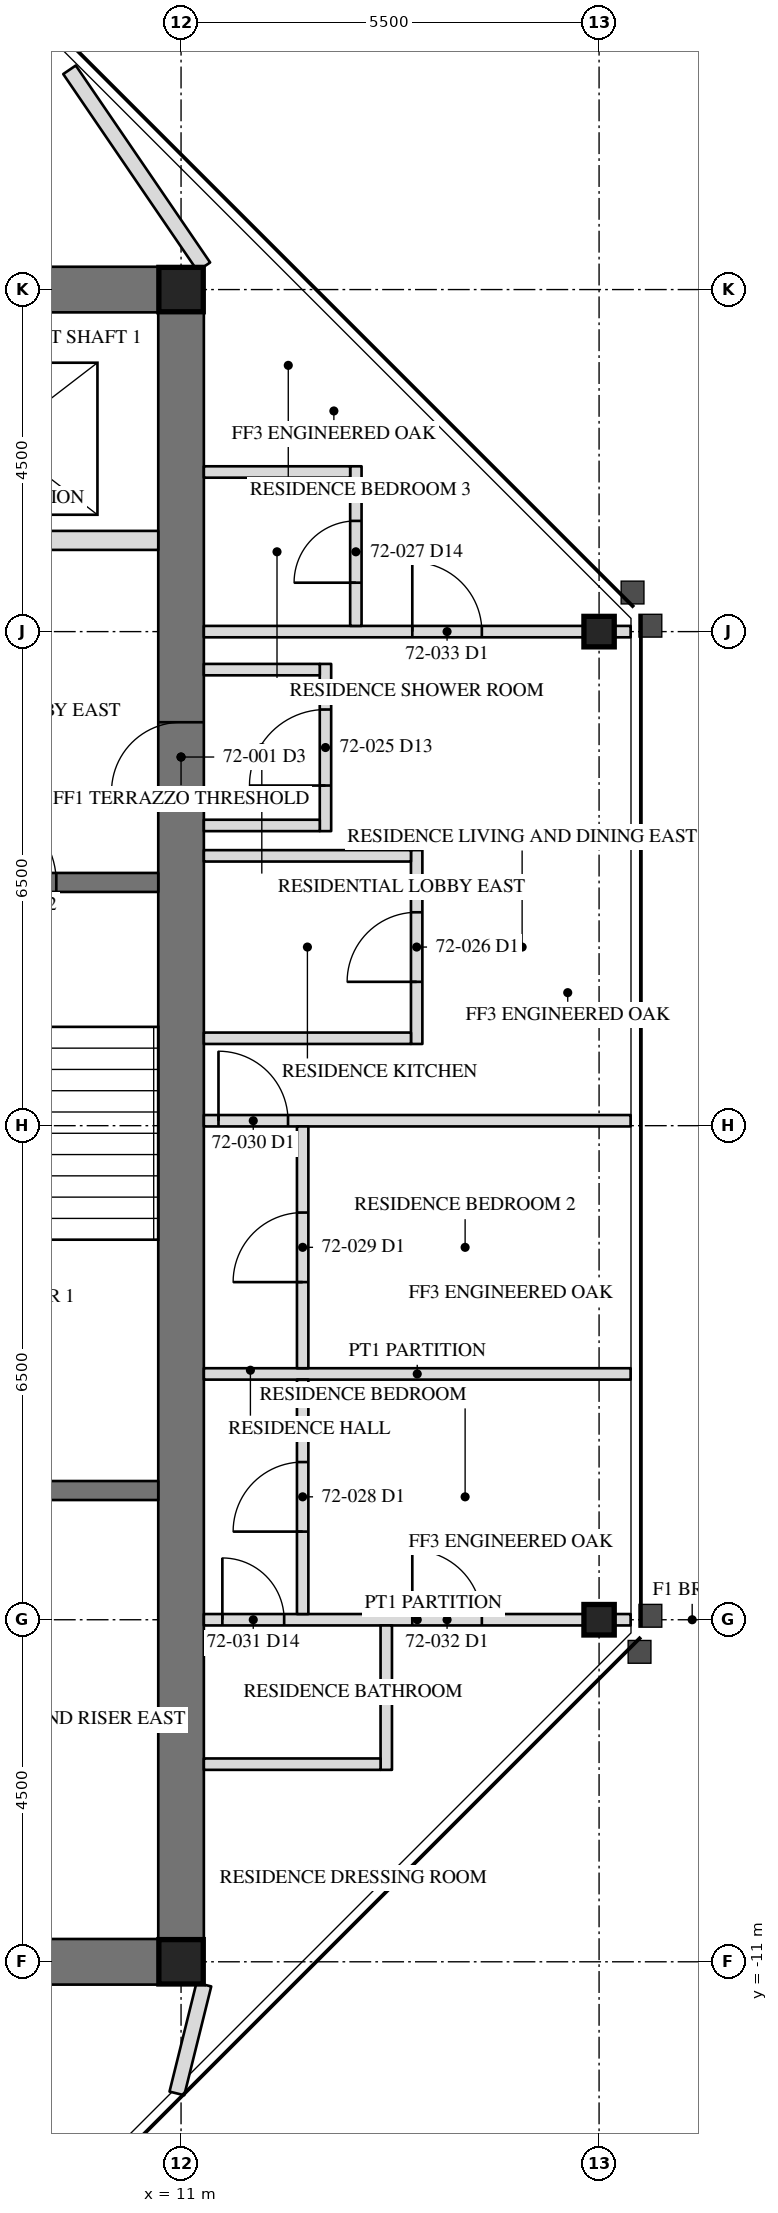
"""IFC4 building model, lengths in metres.
Left out: names, types, materials, properties, quantities, classifications, styles, units other than length and angle.
Written with IfcOpenShell. Run it as: python <this file> out.ifc"""

import sys

from ifc_helpers import new_model, si_unit, direction, frame, frame_2d, origin, origin_2d, place, context, subcontext, project, spatial, rectangle, hollow_rectangle, i_section, extrude, element, fill, save


model = new_model("IFC4")
c1 = context("Model", 3, precision=1e-05, world=origin(), true_north=direction((0.0, 1.0)))
c2 = subcontext(c1, "Body", "Model", "MODEL_VIEW")
j1 = project(units=[si_unit("LENGTHUNIT", "METRE"), si_unit("PLANEANGLEUNIT", "RADIAN")], contexts=[c1])
p1 = place(None, origin())
s1 = spatial("IfcSite", under=j1, at=p1, CompositionType="ELEMENT")
p2 = place(p1, origin())
s2 = spatial("IfcBuilding", under=s1, at=p2, CompositionType="ELEMENT")
p3 = place(p2, frame((0.0, 0.0, 292.0)))
s3 = spatial("IfcBuildingStorey", under=s2, at=p3, CompositionType="ELEMENT", Elevation=292.0)
for number, where, z_axis, x_axis in (
    (1, (16.5, -6.5, 0.0), (0.0, 0.0, 1.0), (0.0, 1.0, 0.0)),
    (2, (16.5, 6.5, 0.0), (0.0, 0.0, 1.0), (0.0, 1.0, 0.0)),
):
    element("IfcColumn", number, at=place(p3, frame(where, z_axis=z_axis, x_axis=x_axis)), inside=s3, PredefinedType="COLUMN", context=c2, shape_type="SweptSolid", body=[
        extrude(i_section(OverallWidth=0.401, OverallDepth=0.399, WebThickness=0.025, FlangeThickness=0.04, at=origin_2d()), origin(), (0.0, 0.0, 1.0), 3.6),
    ])
p4 = place(p3, frame((11.0, -11.0, 0.0), z_axis=(0.0, 0.0, 1.0), x_axis=(0.0, 1.0, 0.0)))
e3 = element("IfcWall", 3, at=p4, inside=s3, PredefinedType="SHEAR", context=c2, shape_type="SweptSolid", body=[
    extrude(rectangle(XDim=22.0, YDim=0.6, at=frame_2d((11.0, 0.0))), origin(), (0.0, 0.0, 1.0), 3.6),
])
p5 = place(p4, frame((15.393, 0.0, 0.0)))
e4 = element("IfcOpeningElement", 4, at=p5, cuts=e3, PredefinedType="OPENING", context=c2, shape_type="SweptSolid", body=[
    extrude(rectangle(XDim=0.915, YDim=2.134, at=frame_2d((0.458, 1.067))), frame((0.0, 0.31, 0.0), z_axis=(0.0, -1.0, 0.0), x_axis=(1.0, 0.0, 0.0)), (0.0, 0.0, 1.0), 0.62),
])
for number, where, z_axis, x_axis in (
    (5, (11.0, 11.0, 0.0), (0.0, 0.0, 1.0), (-1.0, 0.0, 0.0)),
    (6, (6.5, -11.0, 0.0), (0.0, 0.0, 1.0), (1.0, 0.0, 0.0)),
):
    element("IfcWall", number, at=place(p3, frame(where, z_axis=z_axis, x_axis=x_axis)), inside=s3, PredefinedType="SHEAR", context=c2, shape_type="SweptSolid", body=[
        extrude(rectangle(XDim=4.5, YDim=0.6, at=frame_2d((2.25, 0.0))), origin(), (0.0, 0.0, 1.0), 3.6),
    ])
for number, where, z_axis, x_axis in (
    (7, (11.0, 11.0, 0.0), (0.0, 0.0, 1.0), (1.0, 0.0, 0.0)),
    (8, (11.0, -11.0, 0.0), (0.0, 0.0, 1.0), (1.0, 0.0, 0.0)),
):
    element("IfcColumn", number, at=place(p3, frame(where, z_axis=z_axis, x_axis=x_axis)), inside=s3, PredefinedType="COLUMN", context=c2, shape_type="SweptSolid", body=[
        extrude(hollow_rectangle(XDim=0.584, YDim=0.584, WallThickness=0.051, at=origin_2d()), origin(), (0.0, 0.0, 1.0), 3.6),
    ])
p6 = place(p3, frame((6.95, -4.8, 0.0), z_axis=(0.0, 0.0, 1.0), x_axis=(1.0, 0.0, 0.0)))
e9 = element("IfcWall", 9, at=p6, inside=s3, PredefinedType="SOLIDWALL", context=c2, shape_type="SweptSolid", body=[
    extrude(rectangle(XDim=3.75, YDim=0.25, at=frame_2d((1.875, 0.0))), origin(), (0.0, 0.0, 1.0), 3.41),
])
p7 = place(p3, frame((6.95, 3.2, 0.0), z_axis=(0.0, 0.0, 1.0), x_axis=(1.0, 0.0, 0.0)))
e10 = element("IfcWall", 10, at=p7, inside=s3, PredefinedType="SOLIDWALL", context=c2, shape_type="SweptSolid", body=[
    extrude(rectangle(XDim=3.75, YDim=0.25, at=frame_2d((1.875, 0.0))), origin(), (0.0, 0.0, 1.0), 3.41),
])
p8 = place(p7, frame((1.342, 0.0, 0.0)))
e11 = element("IfcOpeningElement", 11, at=p8, cuts=e10, PredefinedType="OPENING", context=c2, shape_type="SweptSolid", body=[
    extrude(rectangle(XDim=1.067, YDim=2.134, at=frame_2d((0.533, 1.067))), frame((0.0, 0.135, 0.0), z_axis=(0.0, -1.0, 0.0), x_axis=(1.0, 0.0, 0.0)), (0.0, 0.0, 1.0), 0.27),
])
p9 = place(p3, frame((6.95, 7.7, 0.0), z_axis=(0.0, 0.0, 1.0), x_axis=(1.0, 0.0, 0.0)))
e12 = element("IfcWall", 12, at=p9, inside=s3, PredefinedType="PARTITIONING", context=c2, shape_type="SweptSolid", body=[
    extrude(rectangle(XDim=3.75, YDim=0.25, at=frame_2d((1.875, 0.0))), origin(), (0.0, 0.0, 1.0), 3.41),
])
p10 = place(p9, frame((0.45, 0.0, 0.0)))
e13 = element("IfcOpeningElement", 13, at=p10, cuts=e12, PredefinedType="OPENING", context=c2, shape_type="SweptSolid", body=[
    extrude(rectangle(XDim=1.219, YDim=2.134, at=frame_2d((0.609, 1.067))), frame((0.0, 0.135, 0.0), z_axis=(0.0, -1.0, 0.0), x_axis=(1.0, 0.0, 0.0)), (0.0, 0.0, 1.0), 0.27),
])
p11 = place(p3, frame((11.3, 11.3, 0.0), z_axis=(0.0, 0.0, 1.0), x_axis=(-0.563469639691, 0.826136771453, 0.0)))
e14 = element("IfcWall", 14, at=p11, inside=s3, PredefinedType="PARTITIONING", context=c2, shape_type="SweptSolid", body=[
    extrude(rectangle(XDim=3.137, YDim=0.2, at=frame_2d((1.568, 0.0))), origin(), (0.0, 0.0, 1.0), 2.704),
])
p12 = place(p3, frame((11.3, -11.3, 0.0), z_axis=(0.0, 0.0, 1.0), x_axis=(-0.24050983258, -0.970646702169, 0.0)))
e15 = element("IfcWall", 15, at=p12, inside=s3, PredefinedType="PARTITIONING", context=c2, shape_type="SweptSolid", body=[
    extrude(rectangle(XDim=1.475, YDim=0.2, at=frame_2d((0.737, 0.0))), origin(), (0.0, 0.0, 1.0), 3.41),
])
p13 = place(p3, frame((11.3, -6.5, 0.0), z_axis=(0.0, 0.0, 1.0), x_axis=(1.0, 0.0, 0.0)))
e16 = element("IfcWall", 16, at=p13, inside=s3, PredefinedType="PARTITIONING", context=c2, shape_type="SweptSolid", body=[
    extrude(rectangle(XDim=5.615, YDim=0.15, at=frame_2d((2.808, 0.0))), origin(), (0.0, 0.0, 1.0), 2.966),
])
p14 = place(p13, frame((0.243, 0.0, 0.0)))
e17 = element("IfcOpeningElement", 17, at=p14, cuts=e16, PredefinedType="OPENING", context=c2, shape_type="SweptSolid", body=[
    extrude(rectangle(XDim=0.813, YDim=2.032, at=frame_2d((0.406, 1.016))), frame((0.0, 0.085, 0.0), z_axis=(0.0, -1.0, 0.0), x_axis=(1.0, 0.0, 0.0)), (0.0, 0.0, 1.0), 0.17),
])
p15 = place(p13, frame((2.742, 0.0, 0.0)))
e18 = element("IfcOpeningElement", 18, at=p15, cuts=e16, PredefinedType="OPENING", context=c2, shape_type="SweptSolid", body=[
    extrude(rectangle(XDim=0.915, YDim=2.134, at=frame_2d((0.458, 1.067))), frame((0.0, 0.085, 0.0), z_axis=(0.0, -1.0, 0.0), x_axis=(1.0, 0.0, 0.0)), (0.0, 0.0, 1.0), 0.17),
])
p16 = place(p3, frame((11.3, -3.266, 0.0), z_axis=(0.0, 0.0, 1.0), x_axis=(1.0, 0.0, 0.0)))
e19 = element("IfcWall", 19, at=p16, inside=s3, PredefinedType="PARTITIONING", context=c2, shape_type="SweptSolid", body=[
    extrude(rectangle(XDim=5.615, YDim=0.15, at=frame_2d((2.808, 0.0))), origin(), (0.0, 0.0, 1.0), 2.709),
])
p17 = place(p3, frame((11.3, 0.065, 0.0), z_axis=(0.0, 0.0, 1.0), x_axis=(1.0, 0.0, 0.0)))
e20 = element("IfcWall", 20, at=p17, inside=s3, PredefinedType="PARTITIONING", context=c2, shape_type="SweptSolid", body=[
    extrude(rectangle(XDim=5.615, YDim=0.15, at=frame_2d((2.808, 0.0))), origin(), (0.0, 0.0, 1.0), 2.709),
])
p18 = place(p17, frame((0.192, 0.0, 0.0)))
e21 = element("IfcOpeningElement", 21, at=p18, cuts=e20, PredefinedType="OPENING", context=c2, shape_type="SweptSolid", body=[
    extrude(rectangle(XDim=0.915, YDim=2.134, at=frame_2d((0.458, 1.067))), frame((0.0, 0.085, 0.0), z_axis=(0.0, -1.0, 0.0), x_axis=(1.0, 0.0, 0.0)), (0.0, 0.0, 1.0), 0.17),
])
p19 = place(p3, frame((11.3, 6.5, 0.0), z_axis=(0.0, 0.0, 1.0), x_axis=(1.0, 0.0, 0.0)))
e22 = element("IfcWall", 22, at=p19, inside=s3, PredefinedType="PARTITIONING", context=c2, shape_type="SweptSolid", body=[
    extrude(rectangle(XDim=5.615, YDim=0.15, at=frame_2d((2.808, 0.0))), origin(), (0.0, 0.0, 1.0), 2.966),
])
p20 = place(p19, frame((2.742, 0.0, 0.0)))
e23 = element("IfcOpeningElement", 23, at=p20, cuts=e22, PredefinedType="OPENING", context=c2, shape_type="SweptSolid", body=[
    extrude(rectangle(XDim=0.915, YDim=2.134, at=frame_2d((0.458, 1.067))), frame((0.0, 0.085, 0.0), z_axis=(0.0, -1.0, 0.0), x_axis=(1.0, 0.0, 0.0)), (0.0, 0.0, 1.0), 0.17),
])
p21 = place(p3, frame((12.9, 3.875, 0.0), z_axis=(0.0, 0.0, 1.0), x_axis=(0.0, 1.0, 0.0)))
e24 = element("IfcWall", 24, at=p21, inside=s3, PredefinedType="PARTITIONING", context=c2, shape_type="SweptSolid", body=[
    extrude(rectangle(XDim=2.2, YDim=0.15, at=frame_2d((1.1, 0.0))), origin(), (0.0, 0.0, 1.0), 3.41),
])
p22 = place(p21, frame((0.6, 0.0, 0.0)))
e25 = element("IfcOpeningElement", 25, at=p22, cuts=e24, PredefinedType="OPENING", context=c2, shape_type="SweptSolid", body=[
    extrude(rectangle(XDim=1.0, YDim=2.134, at=frame_2d((0.5, 1.067))), frame((0.0, 0.085, 0.0), z_axis=(0.0, -1.0, 0.0), x_axis=(1.0, 0.0, 0.0)), (0.0, 0.0, 1.0), 0.17),
])
for number, where, z_axis, x_axis in (
    (26, (11.3, 3.95, 0.0), (0.0, 0.0, 1.0), (1.0, 0.0, 0.0)),
    (27, (11.3, 6.0, 0.0), (0.0, 0.0, 1.0), (1.0, 0.0, 0.0)),
):
    element("IfcWall", number, at=place(p3, frame(where, z_axis=z_axis, x_axis=x_axis)), inside=s3, PredefinedType="PARTITIONING", context=c2, shape_type="SweptSolid", body=[
        extrude(rectangle(XDim=1.525, YDim=0.15, at=frame_2d((0.762, 0.0))), origin(), (0.0, 0.0, 1.0), 3.41),
    ])
p23 = place(p3, frame((14.1, 1.075, 0.0), z_axis=(0.0, 0.0, 1.0), x_axis=(0.0, 1.0, 0.0)))
e28 = element("IfcWall", 28, at=p23, inside=s3, PredefinedType="PARTITIONING", context=c2, shape_type="SweptSolid", body=[
    extrude(rectangle(XDim=2.55, YDim=0.15, at=frame_2d((1.275, 0.0))), origin(), (0.0, 0.0, 1.0), 3.41),
])
p24 = place(p23, frame((0.817, 0.0, 0.0)))
e29 = element("IfcOpeningElement", 29, at=p24, cuts=e28, PredefinedType="OPENING", context=c2, shape_type="SweptSolid", body=[
    extrude(rectangle(XDim=0.915, YDim=2.134, at=frame_2d((0.458, 1.067))), frame((0.0, 0.085, 0.0), z_axis=(0.0, -1.0, 0.0), x_axis=(1.0, 0.0, 0.0)), (0.0, 0.0, 1.0), 0.17),
])
for number, where, z_axis, x_axis in (
    (30, (11.3, 1.15, 0.0), (0.0, 0.0, 1.0), (1.0, 0.0, 0.0)),
    (31, (11.3, 3.55, 0.0), (0.0, 0.0, 1.0), (1.0, 0.0, 0.0)),
):
    element("IfcWall", number, at=place(p3, frame(where, z_axis=z_axis, x_axis=x_axis)), inside=s3, PredefinedType="PARTITIONING", context=c2, shape_type="SweptSolid", body=[
        extrude(rectangle(XDim=2.725, YDim=0.15, at=frame_2d((1.362, 0.0))), origin(), (0.0, 0.0, 1.0), 3.41),
    ])
p25 = place(p3, frame((13.3, 6.575, 0.0), z_axis=(0.0, 0.0, 1.0), x_axis=(0.0, 1.0, 0.0)))
e32 = element("IfcWall", 32, at=p25, inside=s3, PredefinedType="PARTITIONING", context=c2, shape_type="SweptSolid", body=[
    extrude(rectangle(XDim=2.1, YDim=0.15, at=frame_2d((1.05, 0.0))), origin(), (0.0, 0.0, 1.0), 3.41),
])
p26 = place(p25, frame((0.569, 0.0, 0.0)))
e33 = element("IfcOpeningElement", 33, at=p26, cuts=e32, PredefinedType="OPENING", context=c2, shape_type="SweptSolid", body=[
    extrude(rectangle(XDim=0.813, YDim=2.032, at=frame_2d((0.406, 1.016))), frame((0.0, 0.085, 0.0), z_axis=(0.0, -1.0, 0.0), x_axis=(1.0, 0.0, 0.0)), (0.0, 0.0, 1.0), 0.17),
])
p27 = place(p3, frame((11.3, 8.6, 0.0), z_axis=(0.0, 0.0, 1.0), x_axis=(1.0, 0.0, 0.0)))
e34 = element("IfcWall", 34, at=p27, inside=s3, PredefinedType="PARTITIONING", context=c2, shape_type="SweptSolid", body=[
    extrude(rectangle(XDim=1.925, YDim=0.15, at=frame_2d((0.962, 0.0))), origin(), (0.0, 0.0, 1.0), 3.41),
])
p28 = place(p3, frame((12.6, -6.425, 0.0), z_axis=(0.0, 0.0, 1.0), x_axis=(0.0, 1.0, 0.0)))
e35 = element("IfcWall", 35, at=p28, inside=s3, PredefinedType="PARTITIONING", context=c2, shape_type="SweptSolid", body=[
    extrude(rectangle(XDim=3.084, YDim=0.15, at=frame_2d((1.542, 0.0))), origin(), (0.0, 0.0, 1.0), 3.41),
])
p29 = place(p28, frame((1.084, 0.0, 0.0)))
e36 = element("IfcOpeningElement", 36, at=p29, cuts=e35, PredefinedType="OPENING", context=c2, shape_type="SweptSolid", body=[
    extrude(rectangle(XDim=0.915, YDim=2.134, at=frame_2d((0.458, 1.067))), frame((0.0, 0.085, 0.0), z_axis=(0.0, -1.0, 0.0), x_axis=(1.0, 0.0, 0.0)), (0.0, 0.0, 1.0), 0.17),
])
p30 = place(p3, frame((12.6, -3.191, 0.0), z_axis=(0.0, 0.0, 1.0), x_axis=(0.0, 1.0, 0.0)))
e37 = element("IfcWall", 37, at=p30, inside=s3, PredefinedType="PARTITIONING", context=c2, shape_type="SweptSolid", body=[
    extrude(rectangle(XDim=3.181, YDim=0.15, at=frame_2d((1.59, 0.0))), origin(), (0.0, 0.0, 1.0), 3.41),
])
p31 = place(p30, frame((1.133, 0.0, 0.0)))
e38 = element("IfcOpeningElement", 38, at=p31, cuts=e37, PredefinedType="OPENING", context=c2, shape_type="SweptSolid", body=[
    extrude(rectangle(XDim=0.915, YDim=2.134, at=frame_2d((0.458, 1.067))), frame((0.0, 0.085, 0.0), z_axis=(0.0, -1.0, 0.0), x_axis=(1.0, 0.0, 0.0)), (0.0, 0.0, 1.0), 0.17),
])
p32 = place(p3, frame((13.7, -6.575, 0.0), z_axis=(0.0, 0.0, 1.0), x_axis=(0.0, -1.0, 0.0)))
e39 = element("IfcWall", 39, at=p32, inside=s3, PredefinedType="PARTITIONING", context=c2, shape_type="SweptSolid", body=[
    extrude(rectangle(XDim=1.9, YDim=0.15, at=frame_2d((0.95, 0.0))), origin(), (0.0, 0.0, 1.0), 3.41),
])
p33 = place(p3, frame((11.3, -8.4, 0.0), z_axis=(0.0, 0.0, 1.0), x_axis=(1.0, 0.0, 0.0)))
e40 = element("IfcWall", 40, at=p33, inside=s3, PredefinedType="PARTITIONING", context=c2, shape_type="SweptSolid", body=[
    extrude(rectangle(XDim=2.325, YDim=0.15, at=frame_2d((1.163, 0.0))), origin(), (0.0, 0.0, 1.0), 3.41),
])
p34 = place(p5, origin())
e41 = element("IfcDoor", 41, at=p34, inside=s3, OperationType="SINGLE_SWING_RIGHT", PredefinedType="DOOR", context=c2, shape_type="SweptSolid", body=[
    extrude(rectangle(XDim=0.915, YDim=2.134, at=frame_2d((0.458, 1.067))), frame((0.0, -0.225, 0.0), z_axis=(0.0, -1.0, 0.0), x_axis=(1.0, 0.0, 0.0)), (0.0, 0.0, 1.0), 0.05),
])
fill(e4, e41)
p35 = place(p8, origin())
e42 = element("IfcDoor", 42, at=p35, inside=s3, OperationType="SINGLE_SWING_LEFT", PredefinedType="DOOR", context=c2, shape_type="SweptSolid", body=[
    extrude(rectangle(XDim=1.067, YDim=2.134, at=frame_2d((0.533, 1.067))), frame((0.0, 0.025, 0.0), z_axis=(0.0, -1.0, 0.0), x_axis=(1.0, 0.0, 0.0)), (0.0, 0.0, 1.0), 0.05),
])
fill(e11, e42)
p36 = place(p22, origin())
e43 = element("IfcDoor", 43, at=p36, inside=s3, OperationType="SINGLE_SWING_RIGHT", PredefinedType="DOOR", context=c2, shape_type="SweptSolid", body=[
    extrude(rectangle(XDim=1.0, YDim=2.134, at=frame_2d((0.5, 1.067))), frame((0.0, 0.025, 0.0), z_axis=(0.0, -1.0, 0.0), x_axis=(1.0, 0.0, 0.0)), (0.0, 0.0, 1.0), 0.05),
])
fill(e25, e43)
p37 = place(p24, origin())
e44 = element("IfcDoor", 44, at=p37, inside=s3, OperationType="SINGLE_SWING_LEFT", PredefinedType="DOOR", context=c2, shape_type="SweptSolid", body=[
    extrude(rectangle(XDim=0.915, YDim=2.134, at=frame_2d((0.458, 1.067))), frame((0.0, 0.025, 0.0), z_axis=(0.0, -1.0, 0.0), x_axis=(1.0, 0.0, 0.0)), (0.0, 0.0, 1.0), 0.05),
])
fill(e29, e44)
p38 = place(p26, origin())
e45 = element("IfcDoor", 45, at=p38, inside=s3, OperationType="SINGLE_SWING_LEFT", PredefinedType="DOOR", context=c2, shape_type="SweptSolid", body=[
    extrude(rectangle(XDim=0.813, YDim=2.032, at=frame_2d((0.406, 1.016))), frame((0.0, 0.025, 0.0), z_axis=(0.0, -1.0, 0.0), x_axis=(1.0, 0.0, 0.0)), (0.0, 0.0, 1.0), 0.05),
])
fill(e33, e45)
p39 = place(p29, origin())
e46 = element("IfcDoor", 46, at=p39, inside=s3, OperationType="SINGLE_SWING_LEFT", PredefinedType="DOOR", context=c2, shape_type="SweptSolid", body=[
    extrude(rectangle(XDim=0.915, YDim=2.134, at=frame_2d((0.458, 1.067))), frame((0.0, 0.025, 0.0), z_axis=(0.0, -1.0, 0.0), x_axis=(1.0, 0.0, 0.0)), (0.0, 0.0, 1.0), 0.05),
])
fill(e36, e46)
p40 = place(p31, origin())
e47 = element("IfcDoor", 47, at=p40, inside=s3, OperationType="SINGLE_SWING_LEFT", PredefinedType="DOOR", context=c2, shape_type="SweptSolid", body=[
    extrude(rectangle(XDim=0.915, YDim=2.134, at=frame_2d((0.458, 1.067))), frame((0.0, 0.025, 0.0), z_axis=(0.0, -1.0, 0.0), x_axis=(1.0, 0.0, 0.0)), (0.0, 0.0, 1.0), 0.05),
])
fill(e38, e47)
p41 = place(p18, origin())
e48 = element("IfcDoor", 48, at=p41, inside=s3, OperationType="SINGLE_SWING_LEFT", PredefinedType="DOOR", context=c2, shape_type="SweptSolid", body=[
    extrude(rectangle(XDim=0.915, YDim=2.134, at=frame_2d((0.458, 1.067))), frame((0.0, 0.025, 0.0), z_axis=(0.0, -1.0, 0.0), x_axis=(1.0, 0.0, 0.0)), (0.0, 0.0, 1.0), 0.05),
])
fill(e21, e48)
p42 = place(p14, origin())
e49 = element("IfcDoor", 49, at=p42, inside=s3, OperationType="SINGLE_SWING_LEFT", PredefinedType="DOOR", context=c2, shape_type="SweptSolid", body=[
    extrude(rectangle(XDim=0.813, YDim=2.032, at=frame_2d((0.406, 1.016))), frame((0.0, 0.025, 0.0), z_axis=(0.0, -1.0, 0.0), x_axis=(1.0, 0.0, 0.0)), (0.0, 0.0, 1.0), 0.05),
])
fill(e17, e49)
p43 = place(p15, origin())
e50 = element("IfcDoor", 50, at=p43, inside=s3, OperationType="SINGLE_SWING_LEFT", PredefinedType="DOOR", context=c2, shape_type="SweptSolid", body=[
    extrude(rectangle(XDim=0.915, YDim=2.134, at=frame_2d((0.458, 1.067))), frame((0.0, 0.025, 0.0), z_axis=(0.0, -1.0, 0.0), x_axis=(1.0, 0.0, 0.0)), (0.0, 0.0, 1.0), 0.05),
])
fill(e18, e50)
p44 = place(p20, origin())
e51 = element("IfcDoor", 51, at=p44, inside=s3, OperationType="SINGLE_SWING_LEFT", PredefinedType="DOOR", context=c2, shape_type="SweptSolid", body=[
    extrude(rectangle(XDim=0.915, YDim=2.134, at=frame_2d((0.458, 1.067))), frame((0.0, 0.025, 0.0), z_axis=(0.0, -1.0, 0.0), x_axis=(1.0, 0.0, 0.0)), (0.0, 0.0, 1.0), 0.05),
])
fill(e23, e51)
save(model, sys.argv[1])
